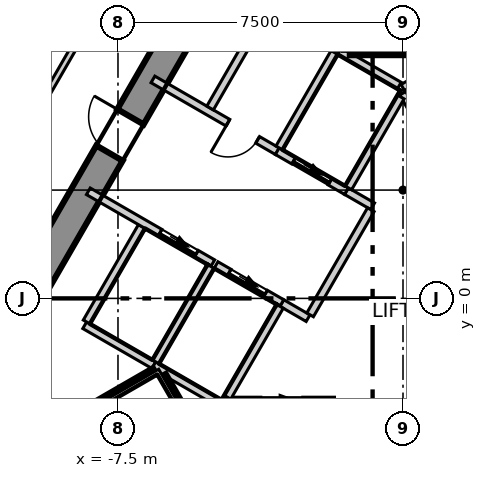
"""IFC4 building model, lengths in metres.
Left out: names, types, materials, properties, quantities, classifications, styles, units other than length and angle.
Written with IfcOpenShell. Run it as: python <this file> out.ifc"""

import sys

from ifc_helpers import new_model, si_unit, direction, frame, frame_2d, origin, place, context, subcontext, project, spatial, polyline, rectangle, outline, extrude, element, fill, save


model = new_model("IFC4")
c1 = context("Model", 3, precision=1e-05, world=origin(), true_north=direction((0.0, 1.0)))
c2 = subcontext(c1, "Body", "Model", "MODEL_VIEW")
j1 = project(units=[si_unit("LENGTHUNIT", "METRE"), si_unit("PLANEANGLEUNIT", "RADIAN")], contexts=[c1])
p1 = place(None, origin())
s1 = spatial("IfcSite", under=j1, at=p1, CompositionType="ELEMENT")
p2 = place(p1, origin())
s2 = spatial("IfcBuilding", under=s1, at=p2, CompositionType="ELEMENT")
p3 = place(p2, frame((0.0, 0.0, 116.3)))
s3 = spatial("IfcBuildingStorey", under=s2, at=p3, CompositionType="ELEMENT", Elevation=116.3)
p4 = place(p3, frame((-1.674, 14.3, -0.3), z_axis=(0.0, 0.0, 1.0), x_axis=(-0.499995765644, -0.866027848477, 0.0)))
e1 = element("IfcWall", 1, at=p4, inside=s3, PredefinedType="SHEAR", context=c2, shape_type="SweptSolid", body=[
    extrude(outline(polyline([(-0.231, -0.4), (1.732, -0.4), (3.695, -0.4), (5.658, -0.4), (7.621, -0.4), (9.584, -0.4), (11.547, -0.4), (13.51, -0.4), (15.473, -0.4), (17.436, -0.4), (19.399, -0.4), (21.362, -0.4), (23.325, -0.4), (22.863, 0.4), (20.977, 0.4), (19.091, 0.4), (17.205, 0.4), (15.319, 0.4), (13.433, 0.4), (11.547, 0.4), (9.661, 0.4), (7.775, 0.4), (5.889, 0.4), (4.003, 0.4), (2.117, 0.4), (0.231, 0.4), (-0.231, -0.4)])), origin(), (0.0, 0.0, 1.0), 4.0),
])
p5 = place(p4, frame((10.997, 0.0, 0.3)))
e2 = element("IfcOpeningElement", 2, at=p5, cuts=e1, PredefinedType="OPENING", context=c2, shape_type="SweptSolid", body=[
    extrude(rectangle(XDim=1.1, YDim=2.1, at=frame_2d((0.55, 1.05))), frame((0.0, 0.41, 0.0), z_axis=(0.0, -1.0, 0.0), x_axis=(1.0, 0.0, 0.0)), (0.0, 0.0, 1.0), 0.82),
])
p6 = place(p3, frame((-3.154, 35.185, 0.0), z_axis=(0.0, 0.0, 1.0), x_axis=(-0.499996704161, -0.866027306629, 0.0)))
e3 = element("IfcWall", 3, at=p6, inside=s3, PredefinedType="ELEMENTEDWALL", context=c2, shape_type="SweptSolid", body=[
    extrude(rectangle(XDim=57.769, YDim=0.2, at=frame_2d((28.884, 0.0))), origin(), (0.0, 0.0, 1.0), 3.7),
])
p7 = place(p6, frame((2.301, 0.0, 0.9)))
e4 = element("IfcOpeningElement", 4, at=p7, cuts=e3, PredefinedType="OPENING", context=c2, shape_type="SweptSolid", body=[
    extrude(rectangle(XDim=4.9, YDim=2.5, at=frame_2d((2.45, 1.25))), frame((0.0, 0.11, 0.0), z_axis=(0.0, -1.0, 0.0), x_axis=(1.0, 0.0, 0.0)), (0.0, 0.0, 1.0), 0.22),
])
p8 = place(p6, frame((9.199, 0.0, 0.9)))
e5 = element("IfcOpeningElement", 5, at=p8, cuts=e3, PredefinedType="OPENING", context=c2, shape_type="SweptSolid", body=[
    extrude(rectangle(XDim=4.9, YDim=2.5, at=frame_2d((2.45, 1.25))), frame((0.0, 0.11, 0.0), z_axis=(0.0, -1.0, 0.0), x_axis=(1.0, 0.0, 0.0)), (0.0, 0.0, 1.0), 0.22),
])
p9 = place(p6, frame((16.097, 0.0, 0.9)))
e6 = element("IfcOpeningElement", 6, at=p9, cuts=e3, PredefinedType="OPENING", context=c2, shape_type="SweptSolid", body=[
    extrude(rectangle(XDim=4.9, YDim=2.5, at=frame_2d((2.45, 1.25))), frame((0.0, 0.11, 0.0), z_axis=(0.0, -1.0, 0.0), x_axis=(1.0, 0.0, 0.0)), (0.0, 0.0, 1.0), 0.22),
])
p10 = place(p6, frame((22.995, 0.0, 0.9)))
e7 = element("IfcOpeningElement", 7, at=p10, cuts=e3, PredefinedType="OPENING", context=c2, shape_type="SweptSolid", body=[
    extrude(rectangle(XDim=4.9, YDim=2.5, at=frame_2d((2.45, 1.25))), frame((0.0, 0.11, 0.0), z_axis=(0.0, -1.0, 0.0), x_axis=(1.0, 0.0, 0.0)), (0.0, 0.0, 1.0), 0.22),
])
p11 = place(p6, frame((29.893, 0.0, 0.9)))
e8 = element("IfcOpeningElement", 8, at=p11, cuts=e3, PredefinedType="OPENING", context=c2, shape_type="SweptSolid", body=[
    extrude(rectangle(XDim=4.9, YDim=2.5, at=frame_2d((2.45, 1.25))), frame((0.0, 0.11, 0.0), z_axis=(0.0, -1.0, 0.0), x_axis=(1.0, 0.0, 0.0)), (0.0, 0.0, 1.0), 0.22),
])
p12 = place(p6, frame((36.791, 0.0, 0.9)))
e9 = element("IfcOpeningElement", 9, at=p12, cuts=e3, PredefinedType="OPENING", context=c2, shape_type="SweptSolid", body=[
    extrude(rectangle(XDim=4.9, YDim=2.5, at=frame_2d((2.45, 1.25))), frame((0.0, 0.11, 0.0), z_axis=(0.0, -1.0, 0.0), x_axis=(1.0, 0.0, 0.0)), (0.0, 0.0, 1.0), 0.22),
])
p13 = place(p6, frame((43.689, 0.0, 0.9)))
e10 = element("IfcOpeningElement", 10, at=p13, cuts=e3, PredefinedType="OPENING", context=c2, shape_type="SweptSolid", body=[
    extrude(rectangle(XDim=4.9, YDim=2.5, at=frame_2d((2.45, 1.25))), frame((0.0, 0.11, 0.0), z_axis=(0.0, -1.0, 0.0), x_axis=(1.0, 0.0, 0.0)), (0.0, 0.0, 1.0), 0.22),
])
p14 = place(p6, frame((50.586, 0.0, 0.9)))
e11 = element("IfcOpeningElement", 11, at=p14, cuts=e3, PredefinedType="OPENING", context=c2, shape_type="SweptSolid", body=[
    extrude(rectangle(XDim=4.9, YDim=2.5, at=frame_2d((2.45, 1.25))), frame((0.0, 0.11, 0.0), z_axis=(0.0, -1.0, 0.0), x_axis=(1.0, 0.0, 0.0)), (0.0, 0.0, 1.0), 0.22),
])
p15 = place(p3, frame((-18.631, -10.67, 0.0), z_axis=(0.0, 0.0, 1.0), x_axis=(0.499981532133, 0.86603606595, 0.0)))
e12 = element("IfcWall", 12, at=p15, inside=s3, PredefinedType="PARTITIONING", context=c2, shape_type="SweptSolid", body=[
    extrude(rectangle(XDim=24.553, YDim=0.15, at=frame_2d((12.277, 0.0))), origin(), (0.0, 0.0, 1.0), 3.7),
])
p16 = place(p15, frame((11.604, 0.0, 0.0)))
e13 = element("IfcOpeningElement", 13, at=p16, cuts=e12, PredefinedType="OPENING", context=c2, shape_type="SweptSolid", body=[
    extrude(rectangle(XDim=1.1, YDim=2.1, at=frame_2d((0.55, 1.05))), frame((0.0, 0.085, 0.0), z_axis=(0.0, -1.0, 0.0), x_axis=(1.0, 0.0, 0.0)), (0.0, 0.0, 1.0), 0.17),
])
p17 = place(p3, frame((0.076, 21.468, 0.0), z_axis=(0.0, 0.0, 1.0), x_axis=(0.500006592492, -0.866021597574, 0.0)))
e14 = element("IfcWall", 14, at=p17, inside=s3, PredefinedType="PARTITIONING", context=c2, shape_type="SweptSolid", body=[
    extrude(rectangle(XDim=17.652, YDim=0.15, at=frame_2d((8.826, 0.0))), origin(), (0.0, 0.0, 1.0), 3.7),
])
p18 = place(p17, frame((6.303, 0.0, 0.0)))
e15 = element("IfcOpeningElement", 15, at=p18, cuts=e14, PredefinedType="OPENING", context=c2, shape_type="SweptSolid", body=[
    extrude(rectangle(XDim=1.1, YDim=2.1, at=frame_2d((0.55, 1.05))), frame((0.0, 0.085, 0.0), z_axis=(0.0, -1.0, 0.0), x_axis=(1.0, 0.0, 0.0)), (0.0, 0.0, 1.0), 0.17),
])
p19 = place(p17, frame((12.403, 0.0, 0.0)))
e16 = element("IfcOpeningElement", 16, at=p19, cuts=e14, PredefinedType="OPENING", context=c2, shape_type="SweptSolid", body=[
    extrude(rectangle(XDim=0.9, YDim=2.1, at=frame_2d((0.45, 1.05))), frame((0.0, 0.085, 0.0), z_axis=(0.0, -1.0, 0.0), x_axis=(1.0, 0.0, 0.0)), (0.0, 0.0, 1.0), 0.17),
])
p20 = place(p17, frame((9.503, 0.0, 0.0)))
e17 = element("IfcOpeningElement", 17, at=p20, cuts=e14, PredefinedType="OPENING", context=c2, shape_type="SweptSolid", body=[
    extrude(rectangle(XDim=1.0, YDim=2.1, at=frame_2d((0.5, 1.05))), frame((0.0, 0.085, 0.0), z_axis=(0.0, -1.0, 0.0), x_axis=(1.0, 0.0, 0.0)), (0.0, 0.0, 1.0), 0.17),
])
p21 = place(p17, frame((1.708, 0.0, 0.0)))
e18 = element("IfcOpeningElement", 18, at=p21, cuts=e14, PredefinedType="OPENING", context=c2, shape_type="SweptSolid", body=[
    extrude(rectangle(XDim=1.1, YDim=2.1, at=frame_2d((0.55, 1.05))), frame((0.0, 0.085, 0.0), z_axis=(0.0, -1.0, 0.0), x_axis=(1.0, 0.0, 0.0)), (0.0, 0.0, 1.0), 0.17),
])
p22 = place(p3, frame((-8.376, -0.707, 0.0), z_axis=(0.0, 0.0, 1.0), x_axis=(0.866067520717, -0.499927044236, 0.0)))
e19 = element("IfcWall", 19, at=p22, inside=s3, PredefinedType="SOLIDWALL", context=c2, shape_type="SweptSolid", body=[
    extrude(rectangle(XDim=2.1, YDim=0.2, at=frame_2d((1.05, 0.0))), origin(), (0.0, 0.0, 1.0), 3.7),
])
p23 = place(p3, frame((-8.326, -0.62, 0.0), z_axis=(0.0, 0.0, 1.0), x_axis=(0.500023687443, 0.866011727401, 0.0)))
e20 = element("IfcWall", 20, at=p23, inside=s3, PredefinedType="SOLIDWALL", context=c2, shape_type="SweptSolid", body=[
    extrude(rectangle(XDim=2.9, YDim=0.2, at=frame_2d((1.45, 0.0))), origin(), (0.0, 0.0, 1.0), 3.7),
])
p24 = place(p3, frame((-4.676, -2.7, 0.0), z_axis=(0.0, 0.0, 1.0), x_axis=(1.0, 0.0, 0.0)))
e21 = element("IfcWall", 21, at=p24, inside=s3, PredefinedType="SOLIDWALL", context=c2, shape_type="SweptSolid", body=[
    extrude(rectangle(XDim=2.873, YDim=0.2, at=frame_2d((1.437, 0.0))), origin(), (0.0, 0.0, 1.0), 3.7),
])
p25 = place(p24, frame((0.937, 0.0, 0.0)))
e22 = element("IfcOpeningElement", 22, at=p25, cuts=e21, PredefinedType="OPENING", context=c2, shape_type="SweptSolid", body=[
    extrude(rectangle(XDim=1.1, YDim=2.1, at=frame_2d((0.55, 1.05))), frame((0.0, 0.11, 0.0), z_axis=(0.0, -1.0, 0.0), x_axis=(1.0, 0.0, 0.0)), (0.0, 0.0, 1.0), 0.22),
])
p26 = place(p3, frame((-0.002, 5.541, 0.0), z_axis=(0.0, 0.0, 1.0), x_axis=(0.86600155993, 0.500041296494, 0.0)))
e23 = element("IfcWall", 23, at=p26, inside=s3, PredefinedType="SOLIDWALL", context=c2, shape_type="SweptSolid", body=[
    extrude(rectangle(XDim=4.132, YDim=0.2, at=frame_2d((2.066, 0.0))), origin(), (0.0, 0.0, 1.0), 3.7),
])
p27 = place(p3, frame((0.0, 5.4, 0.0), z_axis=(0.0, 0.0, 1.0), x_axis=(0.500103862429, -0.865965430478, 0.0)))
e24 = element("IfcWall", 24, at=p27, inside=s3, PredefinedType="SOLIDWALL", context=c2, shape_type="SweptSolid", body=[
    extrude(rectangle(XDim=2.973, YDim=0.2, at=frame_2d((1.487, 0.0))), origin(), (0.0, 0.0, 1.0), 3.7),
])
p28 = place(p27, frame((0.937, 0.0, 0.0)))
e25 = element("IfcOpeningElement", 25, at=p28, cuts=e24, PredefinedType="OPENING", context=c2, shape_type="SweptSolid", body=[
    extrude(rectangle(XDim=1.1, YDim=2.1, at=frame_2d((0.55, 1.05))), frame((0.0, 0.11, 0.0), z_axis=(0.0, -1.0, 0.0), x_axis=(1.0, 0.0, 0.0)), (0.0, 0.0, 1.0), 0.22),
])
p29 = place(p3, frame((-8.28, 2.818, 0.0), z_axis=(0.0, 0.0, 1.0), x_axis=(0.86600175068, -0.50004096614, 0.0)))
e26 = element("IfcWall", 26, at=p29, inside=s3, PredefinedType="SOLIDWALL", context=c2, shape_type="SweptSolid", body=[
    extrude(rectangle(XDim=3.782, YDim=0.2, at=frame_2d((1.891, 0.0))), origin(), (0.0, 0.0, 1.0), 3.7),
])
p30 = place(p29, frame((2.18, 0.0, 0.0)))
e27 = element("IfcOpeningElement", 27, at=p30, cuts=e26, PredefinedType="OPENING", context=c2, shape_type="SweptSolid", body=[
    extrude(rectangle(XDim=1.1, YDim=2.1, at=frame_2d((0.55, 1.05))), frame((0.0, 0.11, 0.0), z_axis=(0.0, -1.0, 0.0), x_axis=(1.0, 0.0, 0.0)), (0.0, 0.0, 1.0), 0.22),
])
p31 = place(p3, frame((-3.188, -0.122, 0.0), z_axis=(0.0, 0.0, 1.0), x_axis=(0.865705793592, -0.50055317294, 0.0)))
e28 = element("IfcWall", 28, at=p31, inside=s3, PredefinedType="SOLIDWALL", context=c2, shape_type="SweptSolid", body=[
    extrude(rectangle(XDim=0.797, YDim=0.2, at=frame_2d((0.398, 0.0))), origin(), (0.0, 0.0, 1.0), 3.7),
])
p32 = place(p3, frame((-6.58, 5.762, 0.0), z_axis=(0.0, 0.0, 1.0), x_axis=(0.866029704776, -0.49999255039, 0.0)))
e29 = element("IfcWall", 29, at=p32, inside=s3, PredefinedType="SOLIDWALL", context=c2, shape_type="SweptSolid", body=[
    extrude(rectangle(XDim=3.782, YDim=0.2, at=frame_2d((1.891, 0.0))), origin(), (0.0, 0.0, 1.0), 3.7),
])
p33 = place(p32, frame((2.279, 0.0, 0.0)))
e30 = element("IfcOpeningElement", 30, at=p33, cuts=e29, PredefinedType="OPENING", context=c2, shape_type="SweptSolid", body=[
    extrude(rectangle(XDim=0.9, YDim=2.1, at=frame_2d((0.45, 1.05))), frame((0.0, 0.11, 0.0), z_axis=(0.0, -1.0, 0.0), x_axis=(1.0, 0.0, 0.0)), (0.0, 0.0, 1.0), 0.22),
])
p34 = place(p3, frame((-1.488, 2.822, 0.0), z_axis=(0.0, 0.0, 1.0), x_axis=(0.866236612152, -0.499633997809, 0.0)))
e31 = element("IfcWall", 31, at=p34, inside=s3, PredefinedType="SOLIDWALL", context=c2, shape_type="SweptSolid", body=[
    extrude(rectangle(XDim=0.796, YDim=0.2, at=frame_2d((0.398, 0.0))), origin(), (0.0, 0.0, 1.0), 3.7),
])
p35 = place(p3, frame((-5.076, 5.009, 0.0), z_axis=(0.0, 0.0, 1.0), x_axis=(0.50002537861, 0.866010750942, 0.0)))
e32 = element("IfcWall", 32, at=p35, inside=s3, PredefinedType="SOLIDWALL", context=c2, shape_type="SweptSolid", body=[
    extrude(rectangle(XDim=3.0, YDim=0.2, at=frame_2d((1.5, 0.0))), origin(), (0.0, 0.0, 1.0), 3.7),
])
p36 = place(p3, frame((-3.489, 7.557, 0.0), z_axis=(0.0, 0.0, 1.0), x_axis=(0.866010750942, -0.50002537861, 0.0)))
e33 = element("IfcWall", 33, at=p36, inside=s3, PredefinedType="SOLIDWALL", context=c2, shape_type="SweptSolid", body=[
    extrude(rectangle(XDim=2.0, YDim=0.2, at=frame_2d((1.0, 0.0))), origin(), (0.0, 0.0, 1.0), 3.7),
])
p37 = place(p3, frame((-2.444, -0.433, 0.0), z_axis=(0.0, 0.0, 1.0), x_axis=(0.500035624827, 0.866004834804, 0.0)))
e34 = element("IfcWall", 34, at=p37, inside=s3, PredefinedType="SOLIDWALL", context=c2, shape_type="SweptSolid", body=[
    extrude(rectangle(XDim=3.194, YDim=0.2, at=frame_2d((1.597, 0.0))), origin(), (0.0, 0.0, 1.0), 3.7),
])
p38 = place(p3, frame((-6.557, -1.757, 0.0), z_axis=(0.0, 0.0, 1.0), x_axis=(0.8659754619, -0.500086491905, 0.0)))
e35 = element("IfcWall", 35, at=p38, inside=s3, PredefinedType="SOLIDWALL", context=c2, shape_type="SweptSolid", body=[
    extrude(rectangle(XDim=1.916, YDim=0.2, at=frame_2d((0.958, 0.0))), origin(), (0.0, 0.0, 1.0), 3.7),
])
p39 = place(p3, frame((-6.507, -1.67, 0.0), z_axis=(0.0, 0.0, 1.0), x_axis=(0.50012328804, 0.865954211699, 0.0)))
e36 = element("IfcWall", 36, at=p39, inside=s3, PredefinedType="SOLIDWALL", context=c2, shape_type="SweptSolid", body=[
    extrude(rectangle(XDim=2.9, YDim=0.2, at=frame_2d((1.45, 0.0))), origin(), (0.0, 0.0, 1.0), 3.7),
])
p40 = place(p3, frame((-4.92, 0.878, 0.0), z_axis=(0.0, 0.0, 1.0), x_axis=(0.866010750942, -0.50002537861, 0.0)))
e37 = element("IfcWall", 37, at=p40, inside=s3, PredefinedType="SOLIDWALL", context=c2, shape_type="SweptSolid", body=[
    extrude(rectangle(XDim=2.0, YDim=0.2, at=frame_2d((1.0, 0.0))), origin(), (0.0, 0.0, 1.0), 3.7),
])
p41 = place(p40, frame((0.4, 0.0, 0.0)))
e38 = element("IfcOpeningElement", 38, at=p41, cuts=e37, PredefinedType="OPENING", context=c2, shape_type="SweptSolid", body=[
    extrude(rectangle(XDim=1.1, YDim=2.1, at=frame_2d((0.55, 1.05))), frame((0.0, 0.11, 0.0), z_axis=(0.0, -1.0, 0.0), x_axis=(1.0, 0.0, 0.0)), (0.0, 0.0, 1.0), 0.22),
])
p42 = place(p3, frame((-4.619, -2.6, 0.0), z_axis=(0.0, 0.0, 1.0), x_axis=(0.50009492287, 0.865970593103, 0.0)))
e39 = element("IfcWall", 39, at=p42, inside=s3, PredefinedType="SOLIDWALL", context=c2, shape_type="SweptSolid", body=[
    extrude(rectangle(XDim=2.761, YDim=0.2, at=frame_2d((1.381, 0.0))), origin(), (0.0, 0.0, 1.0), 3.7),
])
p43 = place(p3, frame((-3.309, 3.873, 0.0), z_axis=(0.0, 0.0, 1.0), x_axis=(0.866098583652, -0.499873227325, 0.0)))
e40 = element("IfcWall", 40, at=p43, inside=s3, PredefinedType="SOLIDWALL", context=c2, shape_type="SweptSolid", body=[
    extrude(rectangle(XDim=2.103, YDim=0.2, at=frame_2d((1.051, 0.0))), origin(), (0.0, 0.0, 1.0), 3.7),
])
p44 = place(p43, frame((0.502, 0.0, 0.0)))
e41 = element("IfcOpeningElement", 41, at=p44, cuts=e40, PredefinedType="OPENING", context=c2, shape_type="SweptSolid", body=[
    extrude(rectangle(XDim=1.1, YDim=2.1, at=frame_2d((0.55, 1.05))), frame((0.0, 0.11, 0.0), z_axis=(0.0, -1.0, 0.0), x_axis=(1.0, 0.0, 0.0)), (0.0, 0.0, 1.0), 0.22),
])
p45 = place(p3, frame((-3.257, 3.959, 0.0), z_axis=(0.0, 0.0, 1.0), x_axis=(0.50012328804, 0.865954211699, 0.0)))
e42 = element("IfcWall", 42, at=p45, inside=s3, PredefinedType="SOLIDWALL", context=c2, shape_type="SweptSolid", body=[
    extrude(rectangle(XDim=2.9, YDim=0.2, at=frame_2d((1.45, 0.0))), origin(), (0.0, 0.0, 1.0), 3.7),
])
p46 = place(p3, frame((-1.67, 6.507, 0.0), z_axis=(0.0, 0.0, 1.0), x_axis=(0.865941441609, -0.500145398563, 0.0)))
e43 = element("IfcWall", 43, at=p46, inside=s3, PredefinedType="SOLIDWALL", context=c2, shape_type="SweptSolid", body=[
    extrude(rectangle(XDim=1.815, YDim=0.2, at=frame_2d((0.908, 0.0))), origin(), (0.0, 0.0, 1.0), 3.7),
])
p47 = place(p3, frame((-1.438, 2.909, 0.0), z_axis=(0.0, 0.0, 1.0), x_axis=(0.499829630636, 0.866123744241, 0.0)))
e44 = element("IfcWall", 44, at=p47, inside=s3, PredefinedType="SOLIDWALL", context=c2, shape_type="SweptSolid", body=[
    extrude(rectangle(XDim=2.761, YDim=0.2, at=frame_2d((1.38, 0.0))), origin(), (0.0, 0.0, 1.0), 3.7),
])
p48 = place(p3, frame((-13.167, -5.754, 0.0), z_axis=(0.0, 0.0, 1.0), x_axis=(0.866060938598, 0.499938446846, 0.0)))
e45 = element("IfcWall", 45, at=p48, inside=s3, PredefinedType="SOLIDWALL", context=c2, shape_type="SweptSolid", body=[
    extrude(rectangle(XDim=7.665, YDim=0.2, at=frame_2d((3.832, 0.0))), origin(), (0.0, 0.0, 1.0), 3.7),
])
p49 = place(p3, frame((-6.329, -2.038, 0.0), z_axis=(0.0, 0.0, 1.0), x_axis=(0.500200581029, -0.865909567298, 0.0)))
e46 = element("IfcWall", 46, at=p49, inside=s3, PredefinedType="SOLIDWALL", context=c2, shape_type="SweptSolid", body=[
    extrude(rectangle(XDim=2.799, YDim=0.2, at=frame_2d((1.399, 0.0))), origin(), (0.0, 0.0, 1.0), 3.7),
])
p50 = place(p3, frame((-1.4, 6.5, 0.0), z_axis=(0.0, 0.0, 1.0), x_axis=(1.0, 0.0, 0.0)))
e47 = element("IfcWall", 47, at=p50, inside=s3, PredefinedType="SOLIDWALL", context=c2, shape_type="SweptSolid", body=[
    extrude(rectangle(XDim=2.8, YDim=0.2, at=frame_2d((1.4, 0.0))), origin(), (0.0, 0.0, 1.0), 3.7),
])
p51 = place(p41, origin())
e48 = element("IfcDoor", 48, at=p51, inside=s3, OperationType="SLIDING_TO_LEFT", PredefinedType="DOOR", context=c2, shape_type="SweptSolid", body=[
    extrude(rectangle(XDim=1.1, YDim=2.1, at=frame_2d((0.55, 1.05))), frame((0.0, 0.025, 0.0), z_axis=(0.0, -1.0, 0.0), x_axis=(1.0, 0.0, 0.0)), (0.0, 0.0, 1.0), 0.05),
])
fill(e38, e48)
p52 = place(p44, origin())
e49 = element("IfcDoor", 49, at=p52, inside=s3, OperationType="SLIDING_TO_LEFT", PredefinedType="DOOR", context=c2, shape_type="SweptSolid", body=[
    extrude(rectangle(XDim=1.1, YDim=2.1, at=frame_2d((0.55, 1.05))), frame((0.0, 0.025, 0.0), z_axis=(0.0, -1.0, 0.0), x_axis=(1.0, 0.0, 0.0)), (0.0, 0.0, 1.0), 0.05),
])
fill(e41, e49)
p53 = place(p30, origin())
e50 = element("IfcDoor", 50, at=p53, inside=s3, OperationType="SLIDING_TO_LEFT", PredefinedType="DOOR", context=c2, shape_type="SweptSolid", body=[
    extrude(rectangle(XDim=1.1, YDim=2.1, at=frame_2d((0.55, 1.05))), frame((0.0, 0.025, 0.0), z_axis=(0.0, -1.0, 0.0), x_axis=(1.0, 0.0, 0.0)), (0.0, 0.0, 1.0), 0.05),
])
fill(e27, e50)
p54 = place(p33, origin())
e51 = element("IfcDoor", 51, at=p54, inside=s3, OperationType="SINGLE_SWING_LEFT", PredefinedType="DOOR", context=c2, shape_type="SweptSolid", body=[
    extrude(rectangle(XDim=0.9, YDim=2.1, at=frame_2d((0.45, 1.05))), frame((0.0, 0.025, 0.0), z_axis=(0.0, -1.0, 0.0), x_axis=(1.0, 0.0, 0.0)), (0.0, 0.0, 1.0), 0.05),
])
fill(e30, e51)
p55 = place(p5, origin())
e52 = element("IfcDoor", 52, at=p55, inside=s3, OperationType="SINGLE_SWING_LEFT", PredefinedType="DOOR", context=c2, shape_type="SweptSolid", body=[
    extrude(rectangle(XDim=1.1, YDim=2.1, at=frame_2d((0.55, 1.05))), frame((0.0, 0.025, 0.0), z_axis=(0.0, -1.0, 0.0), x_axis=(1.0, 0.0, 0.0)), (0.0, 0.0, 1.0), 0.05),
])
fill(e2, e52)
save(model, sys.argv[1])
